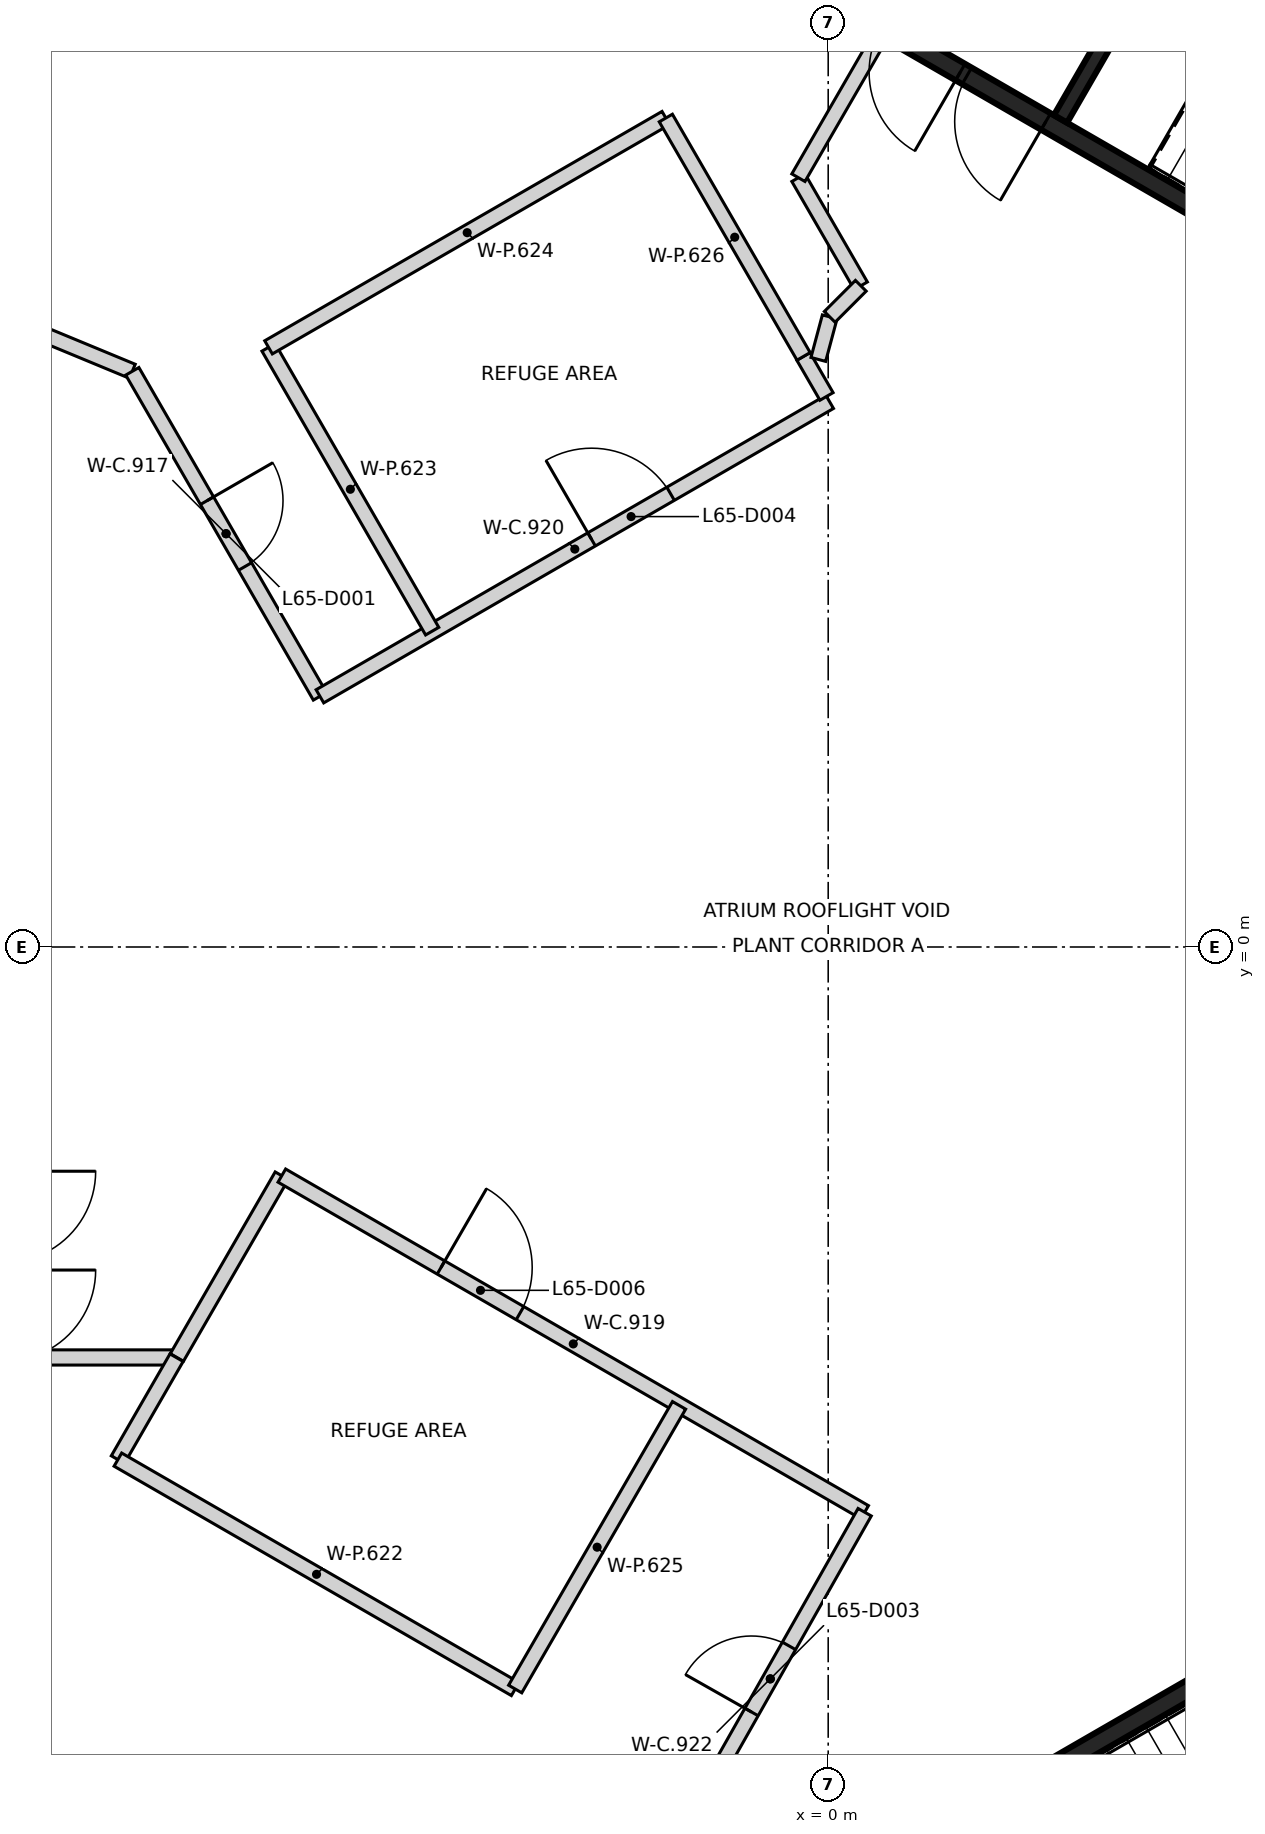
"""IFC4 building model, lengths in metres.
Left out: names, types, materials, properties, quantities, classifications, styles, units other than length and angle.
Written with IfcOpenShell. Run it as: python <this file> out.ifc"""

import sys

from ifc_helpers import new_model, si_unit, direction, frame, frame_2d, origin, origin_2d, place, context, subcontext, project, spatial, rectangle, extrude, element, fill, save


model = new_model("IFC4")
c1 = context("Model", 3, precision=1e-05, world=origin(), true_north=direction((0.0, 1.0)))
c2 = subcontext(c1, "Body", "Model", "MODEL_VIEW")
j1 = project(units=[si_unit("LENGTHUNIT", "METRE"), si_unit("PLANEANGLEUNIT", "RADIAN")], contexts=[c1])
p1 = place(None, origin())
s1 = spatial("IfcSite", under=j1, at=p1, CompositionType="ELEMENT")
p2 = place(p1, origin())
s2 = spatial("IfcBuilding", under=s1, at=p2, CompositionType="ELEMENT")
p3 = place(p2, frame((0.0, 0.0, 257.4)))
s3 = spatial("IfcBuildingStorey", under=s2, at=p3, CompositionType="ELEMENT", Elevation=257.4)
p4 = place(p3, frame((10.42, 6.498, 0.0), z_axis=(0.0, 0.0, 1.0), x_axis=(-0.866021906294, 0.500006057782, 0.0)))
e1 = element("IfcWall", 1, at=p4, inside=s3, PredefinedType="SHEAR", context=c2, shape_type="SweptSolid", body=[
    extrude(rectangle(XDim=11.55, YDim=0.25, at=frame_2d((5.775, 0.0))), origin(), (0.0, 0.0, 1.0), 4.45),
])
p5 = place(p4, frame((10.025, 0.0, 0.0)))
e2 = element("IfcOpeningElement", 2, at=p5, cuts=e1, PredefinedType="OPENING", context=c2, shape_type="SweptSolid", body=[
    extrude(rectangle(XDim=1.2, YDim=2.1, at=frame_2d((0.6, 1.05))), frame((0.0, 0.135, 0.0), z_axis=(0.0, -1.0, 0.0), x_axis=(1.0, 0.0, 0.0)), (0.0, 0.0, 1.0), 0.27),
])
p6 = place(p4, frame((8.725, 0.0, 0.0)))
e3 = element("IfcOpeningElement", 3, at=p6, cuts=e1, PredefinedType="OPENING", context=c2, shape_type="SweptSolid", body=[
    extrude(rectangle(XDim=1.2, YDim=2.1, at=frame_2d((0.6, 1.05))), frame((0.0, 0.135, 0.0), z_axis=(0.0, -1.0, 0.0), x_axis=(1.0, 0.0, 0.0)), (0.0, 0.0, 1.0), 0.27),
])
p7 = place(p3, frame((3.057, 10.895, 0.0), z_axis=(0.0, 0.0, 1.0), x_axis=(0.500027839223, 0.866009330205, 0.0)))
e4 = element("IfcWall", 4, at=p7, inside=s3, PredefinedType="SHEAR", context=c2, shape_type="SweptSolid", body=[
    extrude(rectangle(XDim=5.098, YDim=0.2, at=frame_2d((2.549, 0.0))), origin(), (0.0, 0.0, 1.0), 4.45),
])
p8 = place(p7, frame((1.774, 0.0, 0.0)))
e5 = element("IfcOpeningElement", 5, at=p8, cuts=e4, PredefinedType="OPENING", context=c2, shape_type="SweptSolid", body=[
    extrude(rectangle(XDim=1.4, YDim=2.1, at=frame_2d((0.7, 1.05))), frame((0.0, 0.11, 0.0), z_axis=(0.0, -1.0, 0.0), x_axis=(1.0, 0.0, 0.0)), (0.0, 0.0, 1.0), 0.22),
])
p9 = place(p3, frame((0.417, -12.273, 0.0), z_axis=(0.0, 0.0, 1.0), x_axis=(0.866021906294, 0.500006057782, 0.0)))
e6 = element("IfcWall", 6, at=p9, inside=s3, PredefinedType="SHEAR", context=c2, shape_type="SweptSolid", body=[
    extrude(rectangle(XDim=11.55, YDim=0.25, at=frame_2d((5.775, 0.0))), origin(), (0.0, 0.0, 1.0), 4.45),
])
p10 = place(p9, frame((10.025, 0.0, 0.0)))
e7 = element("IfcOpeningElement", 7, at=p10, cuts=e6, PredefinedType="OPENING", context=c2, shape_type="SweptSolid", body=[
    extrude(rectangle(XDim=1.2, YDim=2.1, at=frame_2d((0.6, 1.05))), frame((0.0, 0.135, 0.0), z_axis=(0.0, -1.0, 0.0), x_axis=(1.0, 0.0, 0.0)), (0.0, 0.0, 1.0), 0.27),
])
p11 = place(p9, frame((8.725, 0.0, 0.0)))
e8 = element("IfcOpeningElement", 8, at=p11, cuts=e6, PredefinedType="OPENING", context=c2, shape_type="SweptSolid", body=[
    extrude(rectangle(XDim=1.2, YDim=2.1, at=frame_2d((0.6, 1.05))), frame((0.0, 0.135, 0.0), z_axis=(0.0, -1.0, 0.0), x_axis=(1.0, 0.0, 0.0)), (0.0, 0.0, 1.0), 0.27),
])
p12 = place(p3, frame((-10.652, -5.4, 0.0), z_axis=(0.0, 0.0, 1.0), x_axis=(1.0, 0.0, 0.0)))
e9 = element("IfcWall", 9, at=p12, inside=s3, PredefinedType="PARTITIONING", context=c2, shape_type="SweptSolid", body=[
    extrude(rectangle(XDim=2.083, YDim=0.2, at=frame_2d((1.042, 0.0))), origin(), (0.0, 0.0, 1.0), 4.45),
])
p13 = place(p3, frame((-10.476, 8.121, 0.0), z_axis=(0.0, 0.0, 1.0), x_axis=(0.923898220274, -0.382638312998, 0.0)))
e10 = element("IfcWall", 10, at=p13, inside=s3, PredefinedType="PARTITIONING", context=c2, shape_type="SweptSolid", body=[
    extrude(rectangle(XDim=1.43, YDim=0.2, at=frame_2d((0.715, 0.0))), origin(), (0.0, 0.0, 1.0), 4.45),
])
p14 = place(p3, frame((-9.155, 7.574, 0.0), z_axis=(0.0, 0.0, 1.0), x_axis=(0.499899390653, -0.866083482827, 0.0)))
e11 = element("IfcWall", 11, at=p14, inside=s3, PredefinedType="PARTITIONING", context=c2, shape_type="SweptSolid", body=[
    extrude(rectangle(XDim=4.937, YDim=0.2, at=frame_2d((2.469, 0.0))), origin(), (0.0, 0.0, 1.0), 4.45),
])
p15 = place(p14, frame((1.966, 0.0, 0.0)))
e12 = element("IfcOpeningElement", 12, at=p15, cuts=e11, PredefinedType="OPENING", context=c2, shape_type="SweptSolid", body=[
    extrude(rectangle(XDim=1.0, YDim=2.1, at=frame_2d((0.5, 1.05))), frame((0.0, 0.11, 0.0), z_axis=(0.0, -1.0, 0.0), x_axis=(1.0, 0.0, 0.0)), (0.0, 0.0, 1.0), 0.22),
])
p16 = place(p3, frame((-8.569, -5.4, 0.0), z_axis=(0.0, 0.0, 1.0), x_axis=(0.499934255424, 0.866063358106, 0.0)))
e13 = element("IfcWall", 13, at=p16, inside=s3, PredefinedType="PARTITIONING", context=c2, shape_type="SweptSolid", body=[
    extrude(rectangle(XDim=2.76, YDim=0.2, at=frame_2d((1.38, 0.0))), origin(), (0.0, 0.0, 1.0), 4.45),
])
p17 = place(p3, frame((-7.188, -3.007, 0.0), z_axis=(0.0, 0.0, 1.0), x_axis=(0.865946804656, -0.500136112979, 0.0)))
e14 = element("IfcWall", 14, at=p17, inside=s3, PredefinedType="PARTITIONING", context=c2, shape_type="SweptSolid", body=[
    extrude(rectangle(XDim=8.855, YDim=0.2, at=frame_2d((4.427, 0.0))), origin(), (0.0, 0.0, 1.0), 4.45),
])
p18 = place(p17, frame((2.418, 0.0, 0.0)))
e15 = element("IfcOpeningElement", 15, at=p18, cuts=e14, PredefinedType="OPENING", context=c2, shape_type="SweptSolid", body=[
    extrude(rectangle(XDim=1.2, YDim=2.1, at=frame_2d((0.6, 1.05))), frame((0.0, 0.11, 0.0), z_axis=(0.0, -1.0, 0.0), x_axis=(1.0, 0.0, 0.0)), (0.0, 0.0, 1.0), 0.22),
])
p19 = place(p3, frame((-6.687, 3.298, 0.0), z_axis=(0.0, 0.0, 1.0), x_axis=(0.865948809334, 0.500132642019, 0.0)))
e16 = element("IfcWall", 16, at=p19, inside=s3, PredefinedType="PARTITIONING", context=c2, shape_type="SweptSolid", body=[
    extrude(rectangle(XDim=7.745, YDim=0.2, at=frame_2d((3.873, 0.0))), origin(), (0.0, 0.0, 1.0), 4.45),
])
p20 = place(p19, frame((4.128, 0.0, 0.0)))
e17 = element("IfcOpeningElement", 17, at=p20, cuts=e16, PredefinedType="OPENING", context=c2, shape_type="SweptSolid", body=[
    extrude(rectangle(XDim=1.2, YDim=2.1, at=frame_2d((0.6, 1.05))), frame((0.0, 0.11, 0.0), z_axis=(0.0, -1.0, 0.0), x_axis=(1.0, 0.0, 0.0)), (0.0, 0.0, 1.0), 0.22),
])
p21 = place(p3, frame((-2.002, -11.819, 0.0), z_axis=(0.0, 0.0, 1.0), x_axis=(0.492742275982, 0.870175298121, 0.0)))
e18 = element("IfcWall", 18, at=p21, inside=s3, PredefinedType="PARTITIONING", context=c2, shape_type="SweptSolid", body=[
    extrude(rectangle(XDim=5.037, YDim=0.2, at=frame_2d((2.519, 0.0))), origin(), (0.0, 0.0, 1.0), 4.45),
])
p22 = place(p21, frame((2.016, 0.0, 0.0)))
e19 = element("IfcOpeningElement", 19, at=p22, cuts=e18, PredefinedType="OPENING", context=c2, shape_type="SweptSolid", body=[
    extrude(rectangle(XDim=1.0, YDim=2.1, at=frame_2d((0.5, 1.05))), frame((0.0, 0.11, 0.0), z_axis=(0.0, -1.0, 0.0), x_axis=(1.0, 0.0, 0.0)), (0.0, 0.0, 1.0), 0.22),
])
p23 = place(p3, frame((-0.392, 10.121, 0.0), z_axis=(0.0, 0.0, 1.0), x_axis=(0.499992716633, -0.866029608798, 0.0)))
e20 = element("IfcWall", 20, at=p23, inside=s3, PredefinedType="PARTITIONING", context=c2, shape_type="SweptSolid", body=[
    extrude(rectangle(XDim=1.642, YDim=0.2, at=frame_2d((0.821, 0.0))), origin(), (0.0, 0.0, 1.0), 4.45),
])
p24 = place(p3, frame((-0.392, 10.121, 0.0), z_axis=(0.0, 0.0, 1.0), x_axis=(0.50017216111, 0.865925983702, 0.0)))
e21 = element("IfcWall", 21, at=p24, inside=s3, PredefinedType="PARTITIONING", context=c2, shape_type="SweptSolid", body=[
    extrude(rectangle(XDim=2.083, YDim=0.2, at=frame_2d((1.042, 0.0))), origin(), (0.0, 0.0, 1.0), 4.45),
])
p25 = place(p3, frame((-0.326, 7.769, 0.0), z_axis=(0.0, 0.0, 1.0), x_axis=(0.500244126355, -0.865884411482, 0.0)))
e22 = element("IfcWall", 22, at=p25, inside=s3, PredefinedType="PARTITIONING", context=c2, shape_type="SweptSolid", body=[
    extrude(rectangle(XDim=0.608, YDim=0.2, at=frame_2d((0.304, 0.0))), origin(), (0.0, 0.0, 1.0), 4.45),
])
p26 = place(p3, frame((-0.13, 7.73, 0.0), z_axis=(0.0, 0.0, 1.0), x_axis=(0.258553659464, 0.965996897085, 0.0)))
e23 = element("IfcWall", 23, at=p26, inside=s3, PredefinedType="PARTITIONING", context=c2, shape_type="SweptSolid", body=[
    extrude(rectangle(XDim=0.58, YDim=0.2, at=frame_2d((0.29, 0.0))), origin(), (0.0, 0.0, 1.0), 4.45),
])
p27 = place(p3, frame((0.02, 8.29, 0.0), z_axis=(0.0, 0.0, 1.0), x_axis=(0.707106781187, 0.707106781187, 0.0)))
e24 = element("IfcWall", 24, at=p27, inside=s3, PredefinedType="PARTITIONING", context=c2, shape_type="SweptSolid", body=[
    extrude(rectangle(XDim=0.578, YDim=0.2, at=frame_2d((0.289, 0.0))), origin(), (0.0, 0.0, 1.0), 4.45),
])
p28 = place(p3, frame((-9.345, -6.744, 0.0), z_axis=(0.0, 0.0, 1.0), x_axis=(0.49895726232, 0.86662659224, 0.0)))
e25 = element("IfcWall", 25, at=p28, inside=s3, PredefinedType="PARTITIONING", context=c2, shape_type="SweptSolid", body=[
    extrude(rectangle(XDim=1.547, YDim=0.2, at=frame_2d((0.773, 0.0))), origin(), (0.0, 0.0, 1.0), 4.45),
])
p29 = place(p3, frame((-9.345, -6.744, 0.0), z_axis=(0.0, 0.0, 1.0), x_axis=(0.866009101611, -0.500028235129, 0.0)))
e26 = element("IfcWall", 26, at=p29, inside=s3, PredefinedType="PARTITIONING", context=c2, shape_type="SweptSolid", body=[
    extrude(rectangle(XDim=6.036, YDim=0.2, at=frame_2d((3.018, 0.0))), origin(), (0.0, 0.0, 1.0), 4.45),
])
p30 = place(p3, frame((-7.363, 7.889, 0.0), z_axis=(0.0, 0.0, 1.0), x_axis=(0.49953283588, -0.866294953164, 0.0)))
e27 = element("IfcWall", 27, at=p30, inside=s3, PredefinedType="PARTITIONING", context=c2, shape_type="SweptSolid", body=[
    extrude(rectangle(XDim=4.31, YDim=0.2, at=frame_2d((2.155, 0.0))), origin(), (0.0, 0.0, 1.0), 4.45),
])
p31 = place(p3, frame((-7.363, 7.889, 0.0), z_axis=(0.0, 0.0, 1.0), x_axis=(0.866079160815, 0.499906878531, 0.0)))
e28 = element("IfcWall", 28, at=p31, inside=s3, PredefinedType="PARTITIONING", context=c2, shape_type="SweptSolid", body=[
    extrude(rectangle(XDim=6.035, YDim=0.2, at=frame_2d((3.018, 0.0))), origin(), (0.0, 0.0, 1.0), 4.45),
])
p32 = place(p3, frame((-4.118, -9.762, 0.0), z_axis=(0.0, 0.0, 1.0), x_axis=(0.500238903755, 0.865887428694, 0.0)))
e29 = element("IfcWall", 29, at=p32, inside=s3, PredefinedType="PARTITIONING", context=c2, shape_type="SweptSolid", body=[
    extrude(rectangle(XDim=4.31, YDim=0.2, at=frame_2d((2.155, 0.0))), origin(), (0.0, 0.0, 1.0), 4.45),
])
p33 = place(p3, frame((-2.136, 10.906, 0.0), z_axis=(0.0, 0.0, 1.0), x_axis=(0.500379794091, -0.865806018497, 0.0)))
e30 = element("IfcWall", 30, at=p33, inside=s3, PredefinedType="PARTITIONING", context=c2, shape_type="SweptSolid", body=[
    extrude(rectangle(XDim=3.622, YDim=0.2, at=frame_2d((1.811, 0.0))), origin(), (0.0, 0.0, 1.0), 4.45),
])
p34 = place(p3, frame((0.0, 0.0, -0.4)))
p35 = place(p34, origin())
p36 = place(p35, frame((0.0, 0.0, 0.35)))
e31 = element("IfcWindow", 31, at=p36, inside=s3, PartitioningType="SINGLE_PANEL", PredefinedType="SKYLIGHT", context=c2, shape_type="SweptSolid", body=[
    extrude(rectangle(XDim=6.41, YDim=4.0, at=origin_2d()), origin(), (0.0, 0.0, 1.0), 0.05),
])
p37 = place(p5, origin())
e32 = element("IfcDoor", 32, at=p37, inside=s3, OperationType="SINGLE_SWING_LEFT", PredefinedType="DOOR", context=c2, shape_type="SweptSolid", body=[
    extrude(rectangle(XDim=1.2, YDim=2.1, at=frame_2d((0.6, 1.05))), frame((0.0, 0.025, 0.0), z_axis=(0.0, -1.0, 0.0), x_axis=(1.0, 0.0, 0.0)), (0.0, 0.0, 1.0), 0.05),
])
fill(e2, e32)
p38 = place(p6, origin())
e33 = element("IfcDoor", 33, at=p38, inside=s3, OperationType="SINGLE_SWING_RIGHT", PredefinedType="DOOR", context=c2, shape_type="SweptSolid", body=[
    extrude(rectangle(XDim=1.2, YDim=2.1, at=frame_2d((0.6, 1.05))), frame((0.0, 0.025, 0.0), z_axis=(0.0, -1.0, 0.0), x_axis=(1.0, 0.0, 0.0)), (0.0, 0.0, 1.0), 0.05),
])
fill(e3, e33)
p39 = place(p15, origin())
e34 = element("IfcDoor", 34, at=p39, inside=s3, OperationType="SINGLE_SWING_LEFT", PredefinedType="DOOR", context=c2, shape_type="SweptSolid", body=[
    extrude(rectangle(XDim=1.0, YDim=2.1, at=frame_2d((0.5, 1.05))), frame((0.0, 0.025, 0.0), z_axis=(0.0, -1.0, 0.0), x_axis=(1.0, 0.0, 0.0)), (0.0, 0.0, 1.0), 0.05),
])
fill(e12, e34)
p40 = place(p22, origin())
e35 = element("IfcDoor", 35, at=p40, inside=s3, OperationType="SINGLE_SWING_LEFT", PredefinedType="DOOR", context=c2, shape_type="SweptSolid", body=[
    extrude(rectangle(XDim=1.0, YDim=2.1, at=frame_2d((0.5, 1.05))), frame((0.0, 0.025, 0.0), z_axis=(0.0, -1.0, 0.0), x_axis=(1.0, 0.0, 0.0)), (0.0, 0.0, 1.0), 0.05),
])
fill(e19, e35)
p41 = place(p20, origin())
e36 = element("IfcDoor", 36, at=p41, inside=s3, OperationType="SINGLE_SWING_LEFT", PredefinedType="DOOR", context=c2, shape_type="SweptSolid", body=[
    extrude(rectangle(XDim=1.2, YDim=2.1, at=frame_2d((0.6, 1.05))), frame((0.0, 0.025, 0.0), z_axis=(0.0, -1.0, 0.0), x_axis=(1.0, 0.0, 0.0)), (0.0, 0.0, 1.0), 0.05),
])
fill(e17, e36)
p42 = place(p18, frame((1.2, 0.0, 0.0), z_axis=(0.0, 0.0, 1.0), x_axis=(-1.0, 0.0, 0.0)))
e37 = element("IfcDoor", 37, at=p42, inside=s3, OperationType="SINGLE_SWING_LEFT", PredefinedType="DOOR", context=c2, shape_type="SweptSolid", body=[
    extrude(rectangle(XDim=1.2, YDim=2.1, at=frame_2d((0.6, 1.05))), frame((0.0, 0.025, 0.0), z_axis=(0.0, -1.0, 0.0), x_axis=(1.0, 0.0, 0.0)), (0.0, 0.0, 1.0), 0.05),
])
fill(e15, e37)
save(model, sys.argv[1])
